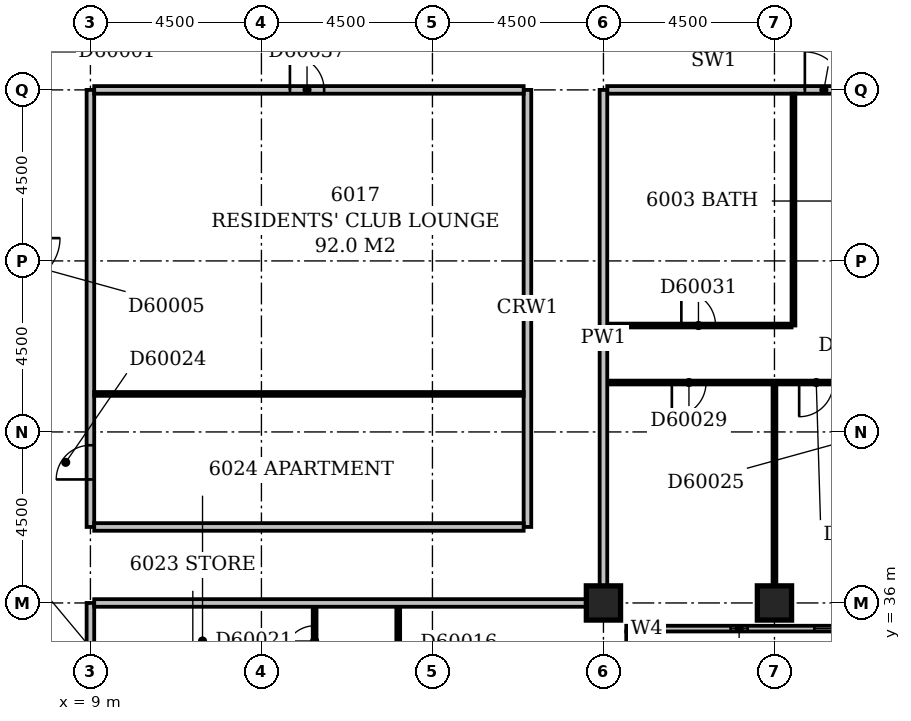
"""IFC4 building model, lengths in metres.
Left out: names, types, materials, properties, quantities, classifications, styles, units other than length and angle.
Written with IfcOpenShell. Run it as: python <this file> out.ifc"""

import sys

from ifc_helpers import new_model, si_unit, direction, frame, frame_2d, origin, origin_2d, place, context, subcontext, project, spatial, rectangle, extrude, element, fill, save


model = new_model("IFC4")
c1 = context("Model", 3, precision=1e-05, world=origin(), true_north=direction((0.0, 1.0)))
c2 = subcontext(c1, "Body", "Model", "MODEL_VIEW")
j1 = project(units=[si_unit("LENGTHUNIT", "METRE"), si_unit("PLANEANGLEUNIT", "RADIAN")], contexts=[c1])
p1 = place(None, origin())
s1 = spatial("IfcSite", under=j1, at=p1, CompositionType="ELEMENT")
p2 = place(p1, origin())
s2 = spatial("IfcBuilding", under=s1, at=p2, CompositionType="ELEMENT")
p3 = place(p2, frame((0.0, 0.0, 233.0)))
s3 = spatial("IfcBuildingStorey", under=s2, at=p3, CompositionType="ELEMENT", Elevation=233.0)
for number, where, z_axis, x_axis in (
    (1, (22.5, 36.0, -0.35), (0.0, 0.0, 1.0), (1.0, 0.0, 0.0)),
    (2, (27.0, 36.0, -0.35), (0.0, 0.0, 1.0), (1.0, 0.0, 0.0)),
):
    element("IfcColumn", number, at=place(p3, frame(where, z_axis=z_axis, x_axis=x_axis)), inside=s3, PredefinedType="COLUMN", context=c2, shape_type="SweptSolid", body=[
        extrude(rectangle(XDim=0.9, YDim=0.9, at=origin_2d()), origin(), (0.0, 0.0, 1.0), 3.65),
    ])
p4 = place(p3, frame((23.175, 17.4, 0.0), z_axis=(0.0, 0.0, 1.0), x_axis=(0.0, 1.0, 0.0)))
e3 = element("IfcWall", 3, at=p4, inside=s3, PredefinedType="STANDARD", context=c2, shape_type="SweptSolid", body=[
    extrude(rectangle(XDim=17.85, YDim=0.15, at=frame_2d((8.925, 0.0))), origin(), (0.0, 0.0, 1.0), 2.7),
])
p5 = place(p4, frame((2.941, 0.0, 0.6)))
e4 = element("IfcOpeningElement", 4, at=p5, cuts=e3, PredefinedType="OPENING", context=c2, shape_type="SweptSolid", body=[
    extrude(rectangle(XDim=1.5, YDim=1.8, at=frame_2d((0.75, 0.9))), frame((0.0, 0.087, 0.0), z_axis=(0.0, -1.0, 0.0), x_axis=(1.0, 0.0, 0.0)), (0.0, 0.0, 1.0), 0.174),
])
p6 = place(p4, frame((6.15, 0.0, 0.6)))
e5 = element("IfcOpeningElement", 5, at=p6, cuts=e3, PredefinedType="OPENING", context=c2, shape_type="SweptSolid", body=[
    extrude(rectangle(XDim=2.4, YDim=1.8, at=frame_2d((1.2, 0.9))), frame((0.0, 0.087, 0.0), z_axis=(0.0, -1.0, 0.0), x_axis=(1.0, 0.0, 0.0)), (0.0, 0.0, 1.0), 0.174),
])
p7 = place(p4, frame((10.65, 0.0, 0.6)))
e6 = element("IfcOpeningElement", 6, at=p7, cuts=e3, PredefinedType="OPENING", context=c2, shape_type="SweptSolid", body=[
    extrude(rectangle(XDim=2.4, YDim=1.8, at=frame_2d((1.2, 0.9))), frame((0.0, 0.087, 0.0), z_axis=(0.0, -1.0, 0.0), x_axis=(1.0, 0.0, 0.0)), (0.0, 0.0, 1.0), 0.174),
])
p8 = place(p4, frame((15.15, 0.0, 0.6)))
e7 = element("IfcOpeningElement", 7, at=p8, cuts=e3, PredefinedType="OPENING", context=c2, shape_type="SweptSolid", body=[
    extrude(rectangle(XDim=2.4, YDim=1.8, at=frame_2d((1.2, 0.9))), frame((0.0, 0.087, 0.0), z_axis=(0.0, -1.0, 0.0), x_axis=(1.0, 0.0, 0.0)), (0.0, 0.0, 1.0), 0.174),
])
p9 = place(p3, frame((23.1, 35.325, 0.0), z_axis=(0.0, 0.0, 1.0), x_axis=(1.0, 0.0, 0.0)))
e8 = element("IfcWall", 8, at=p9, inside=s3, PredefinedType="STANDARD", context=c2, shape_type="SweptSolid", body=[
    extrude(rectangle(XDim=18.15, YDim=0.15, at=frame_2d((9.075, 0.0))), origin(), (0.0, 0.0, 1.0), 2.7),
])
p10 = place(p9, frame((0.239, 0.0, 0.6)))
e9 = element("IfcOpeningElement", 9, at=p10, cuts=e8, PredefinedType="OPENING", context=c2, shape_type="SweptSolid", body=[
    extrude(rectangle(XDim=0.6, YDim=1.8, at=frame_2d((0.3, 0.9))), frame((0.0, 0.087, 0.0), z_axis=(0.0, -1.0, 0.0), x_axis=(1.0, 0.0, 0.0)), (0.0, 0.0, 1.0), 0.174),
])
p11 = place(p9, frame((2.745, 0.0, 0.6)))
e10 = element("IfcOpeningElement", 10, at=p11, cuts=e8, PredefinedType="OPENING", context=c2, shape_type="SweptSolid", body=[
    extrude(rectangle(XDim=0.45, YDim=1.8, at=frame_2d((0.225, 0.9))), frame((0.0, 0.087, 0.0), z_axis=(0.0, -1.0, 0.0), x_axis=(1.0, 0.0, 0.0)), (0.0, 0.0, 1.0), 0.174),
])
p12 = place(p9, frame((4.95, 0.0, 0.6)))
e11 = element("IfcOpeningElement", 11, at=p12, cuts=e8, PredefinedType="OPENING", context=c2, shape_type="SweptSolid", body=[
    extrude(rectangle(XDim=2.4, YDim=1.8, at=frame_2d((1.2, 0.9))), frame((0.0, 0.087, 0.0), z_axis=(0.0, -1.0, 0.0), x_axis=(1.0, 0.0, 0.0)), (0.0, 0.0, 1.0), 0.174),
])
p13 = place(p9, frame((9.45, 0.0, 0.6)))
e12 = element("IfcOpeningElement", 12, at=p13, cuts=e8, PredefinedType="OPENING", context=c2, shape_type="SweptSolid", body=[
    extrude(rectangle(XDim=2.4, YDim=1.8, at=frame_2d((1.2, 0.9))), frame((0.0, 0.087, 0.0), z_axis=(0.0, -1.0, 0.0), x_axis=(1.0, 0.0, 0.0)), (0.0, 0.0, 1.0), 0.174),
])
p14 = place(p9, frame((13.95, 0.0, 0.6)))
e13 = element("IfcOpeningElement", 13, at=p14, cuts=e8, PredefinedType="OPENING", context=c2, shape_type="SweptSolid", body=[
    extrude(rectangle(XDim=2.4, YDim=1.8, at=frame_2d((1.2, 0.9))), frame((0.0, 0.087, 0.0), z_axis=(0.0, -1.0, 0.0), x_axis=(1.0, 0.0, 0.0)), (0.0, 0.0, 1.0), 0.174),
])
p15 = place(p3, frame((17.1, 17.4, 0.0), z_axis=(0.0, 0.0, 1.0), x_axis=(0.0, 1.0, 0.0)))
e14 = element("IfcWall", 14, at=p15, inside=s3, PredefinedType="PARTITIONING", context=c2, shape_type="SweptSolid", body=[
    extrude(rectangle(XDim=18.5, YDim=0.1, at=frame_2d((9.25, 0.0))), origin(), (0.0, 0.0, 1.0), 3.3),
])
p16 = place(p15, frame((4.6, 0.0, 0.0)))
e15 = element("IfcOpeningElement", 15, at=p16, cuts=e14, PredefinedType="OPENING", context=c2, shape_type="SweptSolid", body=[
    extrude(rectangle(XDim=0.9, YDim=2.1, at=frame_2d((0.45, 1.05))), frame((0.0, 0.062, 0.0), z_axis=(0.0, -1.0, 0.0), x_axis=(1.0, 0.0, 0.0)), (0.0, 0.0, 1.0), 0.124),
])
p17 = place(p15, frame((10.25, 0.0, 0.0)))
e16 = element("IfcOpeningElement", 16, at=p17, cuts=e14, PredefinedType="OPENING", context=c2, shape_type="SweptSolid", body=[
    extrude(rectangle(XDim=0.9, YDim=2.1, at=frame_2d((0.45, 1.05))), frame((0.0, 0.062, 0.0), z_axis=(0.0, -1.0, 0.0), x_axis=(1.0, 0.0, 0.0)), (0.0, 0.0, 1.0), 0.124),
])
p18 = place(p15, frame((15.9, 0.0, 0.0)))
e17 = element("IfcOpeningElement", 17, at=p18, cuts=e14, PredefinedType="OPENING", context=c2, shape_type="SweptSolid", body=[
    extrude(rectangle(XDim=0.9, YDim=2.1, at=frame_2d((0.45, 1.05))), frame((0.0, 0.062, 0.0), z_axis=(0.0, -1.0, 0.0), x_axis=(1.0, 0.0, 0.0)), (0.0, 0.0, 1.0), 0.124),
])
p19 = place(p3, frame((9.0, 18.45, 0.0), z_axis=(0.0, 0.0, 1.0), x_axis=(0.0, 1.0, 0.0)))
e18 = element("IfcWall", 18, at=p19, inside=s3, PredefinedType="PARTITIONING", context=c2, shape_type="SweptSolid", body=[
    extrude(rectangle(XDim=17.55, YDim=0.2, at=frame_2d((8.775, 0.0))), origin(), (0.0, 0.0, 1.0), 3.3),
])
p20 = place(p19, frame((6.25, 0.0, 0.0)))
e19 = element("IfcOpeningElement", 19, at=p20, cuts=e18, PredefinedType="OPENING", context=c2, shape_type="SweptSolid", body=[
    extrude(rectangle(XDim=1.0, YDim=2.1, at=frame_2d((0.5, 1.05))), frame((0.0, 0.112, 0.0), z_axis=(0.0, -1.0, 0.0), x_axis=(1.0, 0.0, 0.0)), (0.0, 0.0, 1.0), 0.224),
])
p21 = place(p3, frame((14.9, 26.0, 0.0), z_axis=(0.0, 0.0, 1.0), x_axis=(0.0, 1.0, 0.0)))
e20 = element("IfcWall", 20, at=p21, inside=s3, PredefinedType="PARTITIONING", context=c2, shape_type="SweptSolid", body=[
    extrude(rectangle(XDim=9.9, YDim=0.1, at=frame_2d((4.95, 0.0))), origin(), (0.0, 0.0, 1.0), 3.3),
])
p22 = place(p21, frame((0.8, 0.0, 0.0)))
e21 = element("IfcOpeningElement", 21, at=p22, cuts=e20, PredefinedType="OPENING", context=c2, shape_type="SweptSolid", body=[
    extrude(rectangle(XDim=0.8, YDim=2.1, at=frame_2d((0.4, 1.05))), frame((0.0, 0.062, 0.0), z_axis=(0.0, -1.0, 0.0), x_axis=(1.0, 0.0, 0.0)), (0.0, 0.0, 1.0), 0.124),
])
p23 = place(p21, frame((3.1, 0.0, 0.0)))
e22 = element("IfcOpeningElement", 22, at=p23, cuts=e20, PredefinedType="OPENING", context=c2, shape_type="SweptSolid", body=[
    extrude(rectangle(XDim=0.8, YDim=2.1, at=frame_2d((0.4, 1.05))), frame((0.0, 0.062, 0.0), z_axis=(0.0, -1.0, 0.0), x_axis=(1.0, 0.0, 0.0)), (0.0, 0.0, 1.0), 0.124),
])
p24 = place(p21, frame((6.8, 0.0, 0.0)))
e23 = element("IfcOpeningElement", 23, at=p24, cuts=e20, PredefinedType="OPENING", context=c2, shape_type="SweptSolid", body=[
    extrude(rectangle(XDim=0.8, YDim=2.1, at=frame_2d((0.4, 1.05))), frame((0.0, 0.062, 0.0), z_axis=(0.0, -1.0, 0.0), x_axis=(1.0, 0.0, 0.0)), (0.0, 0.0, 1.0), 0.124),
])
p25 = place(p21, frame((8.6, 0.0, 0.0)))
e24 = element("IfcOpeningElement", 24, at=p25, cuts=e20, PredefinedType="OPENING", context=c2, shape_type="SweptSolid", body=[
    extrude(rectangle(XDim=0.8, YDim=2.1, at=frame_2d((0.4, 1.05))), frame((0.0, 0.062, 0.0), z_axis=(0.0, -1.0, 0.0), x_axis=(1.0, 0.0, 0.0)), (0.0, 0.0, 1.0), 0.124),
])
p26 = place(p21, frame((5.1, 0.0, 0.0)))
e25 = element("IfcOpeningElement", 25, at=p26, cuts=e20, PredefinedType="OPENING", context=c2, shape_type="SweptSolid", body=[
    extrude(rectangle(XDim=0.8, YDim=2.1, at=frame_2d((0.4, 1.05))), frame((0.0, 0.062, 0.0), z_axis=(0.0, -1.0, 0.0), x_axis=(1.0, 0.0, 0.0)), (0.0, 0.0, 1.0), 0.124),
])
p27 = place(p3, frame((9.1, 36.0, 0.0), z_axis=(0.0, 0.0, 1.0), x_axis=(1.0, 0.0, 0.0)))
e26 = element("IfcWall", 26, at=p27, inside=s3, PredefinedType="PARTITIONING", context=c2, shape_type="SweptSolid", body=[
    extrude(rectangle(XDim=12.95, YDim=0.2, at=frame_2d((6.475, 0.0))), origin(), (0.0, 0.0, 1.0), 3.3),
])
p28 = place(p3, frame((22.5, 36.45, 0.0), z_axis=(0.0, 0.0, 1.0), x_axis=(0.0, 1.0, 0.0)))
e27 = element("IfcWall", 27, at=p28, inside=s3, PredefinedType="PARTITIONING", context=c2, shape_type="SweptSolid", body=[
    extrude(rectangle(XDim=13.05, YDim=0.2, at=frame_2d((6.525, 0.0))), origin(), (0.0, 0.0, 1.0), 3.3),
])
p29 = place(p3, frame((27.0, 36.45, 0.0), z_axis=(0.0, 0.0, 1.0), x_axis=(0.0, 1.0, 0.0)))
e28 = element("IfcWall", 28, at=p29, inside=s3, PredefinedType="PARTITIONING", context=c2, shape_type="SweptSolid", body=[
    extrude(rectangle(XDim=5.3, YDim=0.1, at=frame_2d((2.65, 0.0))), origin(), (0.0, 0.0, 1.0), 2.4),
])
p30 = place(p3, frame((9.0, 38.0, 0.0), z_axis=(0.0, 0.0, 1.0), x_axis=(0.0, 1.0, 0.0)))
e29 = element("IfcWall", 29, at=p30, inside=s3, PredefinedType="PARTITIONING", context=c2, shape_type="SweptSolid", body=[
    extrude(rectangle(XDim=11.5, YDim=0.2, at=frame_2d((5.75, 0.0))), origin(), (0.0, 0.0, 1.0), 3.3),
])
p31 = place(p30, frame((1.25, 0.0, 0.0)))
e30 = element("IfcOpeningElement", 30, at=p31, cuts=e29, PredefinedType="OPENING", context=c2, shape_type="SweptSolid", body=[
    extrude(rectangle(XDim=0.9, YDim=2.1, at=frame_2d((0.45, 1.05))), frame((0.0, 0.112, 0.0), z_axis=(0.0, -1.0, 0.0), x_axis=(1.0, 0.0, 0.0)), (0.0, 0.0, 1.0), 0.224),
])
p32 = place(p3, frame((9.1, 38.0, 0.0), z_axis=(0.0, 0.0, 1.0), x_axis=(1.0, 0.0, 0.0)))
e31 = element("IfcWall", 31, at=p32, inside=s3, PredefinedType="PARTITIONING", context=c2, shape_type="SweptSolid", body=[
    extrude(rectangle(XDim=11.3, YDim=0.2, at=frame_2d((5.65, 0.0))), origin(), (0.0, 0.0, 1.0), 3.3),
])
p33 = place(p3, frame((20.5, 38.0, 0.0), z_axis=(0.0, 0.0, 1.0), x_axis=(0.0, 1.0, 0.0)))
e32 = element("IfcWall", 32, at=p33, inside=s3, PredefinedType="PARTITIONING", context=c2, shape_type="SweptSolid", body=[
    extrude(rectangle(XDim=11.5, YDim=0.2, at=frame_2d((5.75, 0.0))), origin(), (0.0, 0.0, 1.0), 3.3),
])
p34 = place(p3, frame((9.1, 41.5, 0.0), z_axis=(0.0, 0.0, 1.0), x_axis=(1.0, 0.0, 0.0)))
e33 = element("IfcWall", 33, at=p34, inside=s3, PredefinedType="PARTITIONING", context=c2, shape_type="SweptSolid", body=[
    extrude(rectangle(XDim=11.3, YDim=0.1, at=frame_2d((5.65, 0.0))), origin(), (0.0, 0.0, 1.0), 3.3),
])
p35 = place(p3, frame((22.6, 41.8, 0.0), z_axis=(0.0, 0.0, 1.0), x_axis=(1.0, 0.0, 0.0)))
e34 = element("IfcWall", 34, at=p35, inside=s3, PredefinedType="PARTITIONING", context=c2, shape_type="SweptSolid", body=[
    extrude(rectangle(XDim=8.8, YDim=0.1, at=frame_2d((4.4, 0.0))), origin(), (0.0, 0.0, 1.0), 3.3),
])
p36 = place(p35, frame((1.7, 0.0, 0.0)))
e35 = element("IfcOpeningElement", 35, at=p36, cuts=e34, PredefinedType="OPENING", context=c2, shape_type="SweptSolid", body=[
    extrude(rectangle(XDim=0.9, YDim=2.1, at=frame_2d((0.45, 1.05))), frame((0.0, 0.062, 0.0), z_axis=(0.0, -1.0, 0.0), x_axis=(1.0, 0.0, 0.0)), (0.0, 0.0, 1.0), 0.124),
])
p37 = place(p35, frame((5.05, 0.0, 0.0)))
e36 = element("IfcOpeningElement", 36, at=p37, cuts=e34, PredefinedType="OPENING", context=c2, shape_type="SweptSolid", body=[
    extrude(rectangle(XDim=0.9, YDim=2.1, at=frame_2d((0.45, 1.05))), frame((0.0, 0.062, 0.0), z_axis=(0.0, -1.0, 0.0), x_axis=(1.0, 0.0, 0.0)), (0.0, 0.0, 1.0), 0.124),
])
p38 = place(p3, frame((22.6, 43.3, 0.0), z_axis=(0.0, 0.0, 1.0), x_axis=(1.0, 0.0, 0.0)))
e37 = element("IfcWall", 37, at=p38, inside=s3, PredefinedType="PARTITIONING", context=c2, shape_type="SweptSolid", body=[
    extrude(rectangle(XDim=4.85, YDim=0.1, at=frame_2d((2.425, 0.0))), origin(), (0.0, 0.0, 1.0), 3.3),
])
p39 = place(p38, frame((1.95, 0.0, 0.0)))
e38 = element("IfcOpeningElement", 38, at=p39, cuts=e37, PredefinedType="OPENING", context=c2, shape_type="SweptSolid", body=[
    extrude(rectangle(XDim=0.9, YDim=2.1, at=frame_2d((0.45, 1.05))), frame((0.0, 0.062, 0.0), z_axis=(0.0, -1.0, 0.0), x_axis=(1.0, 0.0, 0.0)), (0.0, 0.0, 1.0), 0.124),
])
p40 = place(p3, frame((27.5, 43.3, 0.0), z_axis=(0.0, 0.0, 1.0), x_axis=(0.0, 1.0, 0.0)))
e39 = element("IfcWall", 39, at=p40, inside=s3, PredefinedType="PARTITIONING", context=c2, shape_type="SweptSolid", body=[
    extrude(rectangle(XDim=6.1, YDim=0.1, at=frame_2d((3.05, 0.0))), origin(), (0.0, 0.0, 1.0), 2.4),
])
p41 = place(p3, frame((9.1, 49.5, 0.0), z_axis=(0.0, 0.0, 1.0), x_axis=(1.0, 0.0, 0.0)))
e40 = element("IfcWall", 40, at=p41, inside=s3, PredefinedType="PARTITIONING", context=c2, shape_type="SweptSolid", body=[
    extrude(rectangle(XDim=11.3, YDim=0.2, at=frame_2d((5.65, 0.0))), origin(), (0.0, 0.0, 1.0), 3.3),
])
p42 = place(p41, frame((5.15, 0.0, 0.0)))
e41 = element("IfcOpeningElement", 41, at=p42, cuts=e40, PredefinedType="OPENING", context=c2, shape_type="SweptSolid", body=[
    extrude(rectangle(XDim=0.9, YDim=2.1, at=frame_2d((0.45, 1.05))), frame((0.0, 0.112, 0.0), z_axis=(0.0, -1.0, 0.0), x_axis=(1.0, 0.0, 0.0)), (0.0, 0.0, 1.0), 0.224),
])
p43 = place(p3, frame((22.6, 49.5, 0.0), z_axis=(0.0, 0.0, 1.0), x_axis=(1.0, 0.0, 0.0)))
e42 = element("IfcWall", 42, at=p43, inside=s3, PredefinedType="PARTITIONING", context=c2, shape_type="SweptSolid", body=[
    extrude(rectangle(XDim=21.95, YDim=0.2, at=frame_2d((10.975, 0.0))), origin(), (0.0, 0.0, 1.0), 3.3),
])
p44 = place(p43, frame((5.2, 0.0, 0.0)))
e43 = element("IfcOpeningElement", 43, at=p44, cuts=e42, PredefinedType="OPENING", context=c2, shape_type="SweptSolid", body=[
    extrude(rectangle(XDim=1.0, YDim=2.1, at=frame_2d((0.5, 1.05))), frame((0.0, 0.112, 0.0), z_axis=(0.0, -1.0, 0.0), x_axis=(1.0, 0.0, 0.0)), (0.0, 0.0, 1.0), 0.224),
])
p45 = place(p43, frame((9.2, 0.0, 0.0)))
e44 = element("IfcOpeningElement", 44, at=p45, cuts=e42, PredefinedType="OPENING", context=c2, shape_type="SweptSolid", body=[
    extrude(rectangle(XDim=1.0, YDim=2.1, at=frame_2d((0.5, 1.05))), frame((0.0, 0.112, 0.0), z_axis=(0.0, -1.0, 0.0), x_axis=(1.0, 0.0, 0.0)), (0.0, 0.0, 1.0), 0.224),
])
p46 = place(p10, origin())
e45 = element("IfcWindow", 45, at=p46, inside=s3, PartitioningType="SINGLE_PANEL", PredefinedType="WINDOW", context=c2, shape_type="SweptSolid", body=[
    extrude(rectangle(XDim=0.6, YDim=1.8, at=frame_2d((0.3, 0.9))), frame((0.0, 0.03, 0.0), z_axis=(0.0, -1.0, 0.0), x_axis=(1.0, 0.0, 0.0)), (0.0, 0.0, 1.0), 0.06),
])
fill(e9, e45)
p47 = place(p11, origin())
e46 = element("IfcWindow", 46, at=p47, inside=s3, PartitioningType="SINGLE_PANEL", PredefinedType="WINDOW", context=c2, shape_type="SweptSolid", body=[
    extrude(rectangle(XDim=0.45, YDim=1.8, at=frame_2d((0.225, 0.9))), frame((0.0, 0.03, 0.0), z_axis=(0.0, -1.0, 0.0), x_axis=(1.0, 0.0, 0.0)), (0.0, 0.0, 1.0), 0.06),
])
fill(e10, e46)
p48 = place(p12, origin())
e47 = element("IfcWindow", 47, at=p48, inside=s3, PartitioningType="SINGLE_PANEL", PredefinedType="WINDOW", context=c2, shape_type="SweptSolid", body=[
    extrude(rectangle(XDim=2.4, YDim=1.8, at=frame_2d((1.2, 0.9))), frame((0.0, 0.03, 0.0), z_axis=(0.0, -1.0, 0.0), x_axis=(1.0, 0.0, 0.0)), (0.0, 0.0, 1.0), 0.06),
])
fill(e11, e47)
p49 = place(p25, origin())
e48 = element("IfcDoor", 48, at=p49, inside=s3, OperationType="SINGLE_SWING_LEFT", PredefinedType="DOOR", context=c2, shape_type="SweptSolid", body=[
    extrude(rectangle(XDim=0.8, YDim=2.1, at=frame_2d((0.4, 1.05))), frame((0.0, 0.025, 0.0), z_axis=(0.0, -1.0, 0.0), x_axis=(1.0, 0.0, 0.0)), (0.0, 0.0, 1.0), 0.05),
])
fill(e24, e48)
p50 = place(p31, origin())
e49 = element("IfcDoor", 49, at=p50, inside=s3, OperationType="SINGLE_SWING_LEFT", PredefinedType="DOOR", context=c2, shape_type="SweptSolid", body=[
    extrude(rectangle(XDim=0.9, YDim=2.1, at=frame_2d((0.45, 1.05))), frame((0.0, 0.025, 0.0), z_axis=(0.0, -1.0, 0.0), x_axis=(1.0, 0.0, 0.0)), (0.0, 0.0, 1.0), 0.05),
])
fill(e30, e49)
p51 = place(p36, frame((0.9, 0.0, 0.0), z_axis=(0.0, 0.0, 1.0), x_axis=(-1.0, 0.0, 0.0)))
e50 = element("IfcDoor", 50, at=p51, inside=s3, OperationType="SINGLE_SWING_RIGHT", PredefinedType="DOOR", context=c2, shape_type="SweptSolid", body=[
    extrude(rectangle(XDim=0.9, YDim=2.1, at=frame_2d((0.45, 1.05))), frame((0.0, 0.025, 0.0), z_axis=(0.0, -1.0, 0.0), x_axis=(1.0, 0.0, 0.0)), (0.0, 0.0, 1.0), 0.05),
])
fill(e35, e50)
p52 = place(p37, frame((0.9, 0.0, 0.0), z_axis=(0.0, 0.0, 1.0), x_axis=(-1.0, 0.0, 0.0)))
e51 = element("IfcDoor", 51, at=p52, inside=s3, OperationType="SINGLE_SWING_RIGHT", PredefinedType="DOOR", context=c2, shape_type="SweptSolid", body=[
    extrude(rectangle(XDim=0.9, YDim=2.1, at=frame_2d((0.45, 1.05))), frame((0.0, 0.025, 0.0), z_axis=(0.0, -1.0, 0.0), x_axis=(1.0, 0.0, 0.0)), (0.0, 0.0, 1.0), 0.05),
])
fill(e36, e51)
p53 = place(p39, origin())
e52 = element("IfcDoor", 52, at=p53, inside=s3, OperationType="SINGLE_SWING_LEFT", PredefinedType="DOOR", context=c2, shape_type="SweptSolid", body=[
    extrude(rectangle(XDim=0.9, YDim=2.1, at=frame_2d((0.45, 1.05))), frame((0.0, 0.025, 0.0), z_axis=(0.0, -1.0, 0.0), x_axis=(1.0, 0.0, 0.0)), (0.0, 0.0, 1.0), 0.05),
])
fill(e38, e52)
p54 = place(p42, origin())
e53 = element("IfcDoor", 53, at=p54, inside=s3, OperationType="SINGLE_SWING_LEFT", PredefinedType="DOOR", context=c2, shape_type="SweptSolid", body=[
    extrude(rectangle(XDim=0.9, YDim=2.1, at=frame_2d((0.45, 1.05))), frame((0.0, 0.025, 0.0), z_axis=(0.0, -1.0, 0.0), x_axis=(1.0, 0.0, 0.0)), (0.0, 0.0, 1.0), 0.05),
])
fill(e41, e53)
p55 = place(p44, origin())
e54 = element("IfcDoor", 54, at=p55, inside=s3, OperationType="SINGLE_SWING_LEFT", PredefinedType="DOOR", context=c2, shape_type="SweptSolid", body=[
    extrude(rectangle(XDim=1.0, YDim=2.1, at=frame_2d((0.5, 1.05))), frame((0.0, 0.025, 0.0), z_axis=(0.0, -1.0, 0.0), x_axis=(1.0, 0.0, 0.0)), (0.0, 0.0, 1.0), 0.05),
])
fill(e43, e54)
save(model, sys.argv[1])
